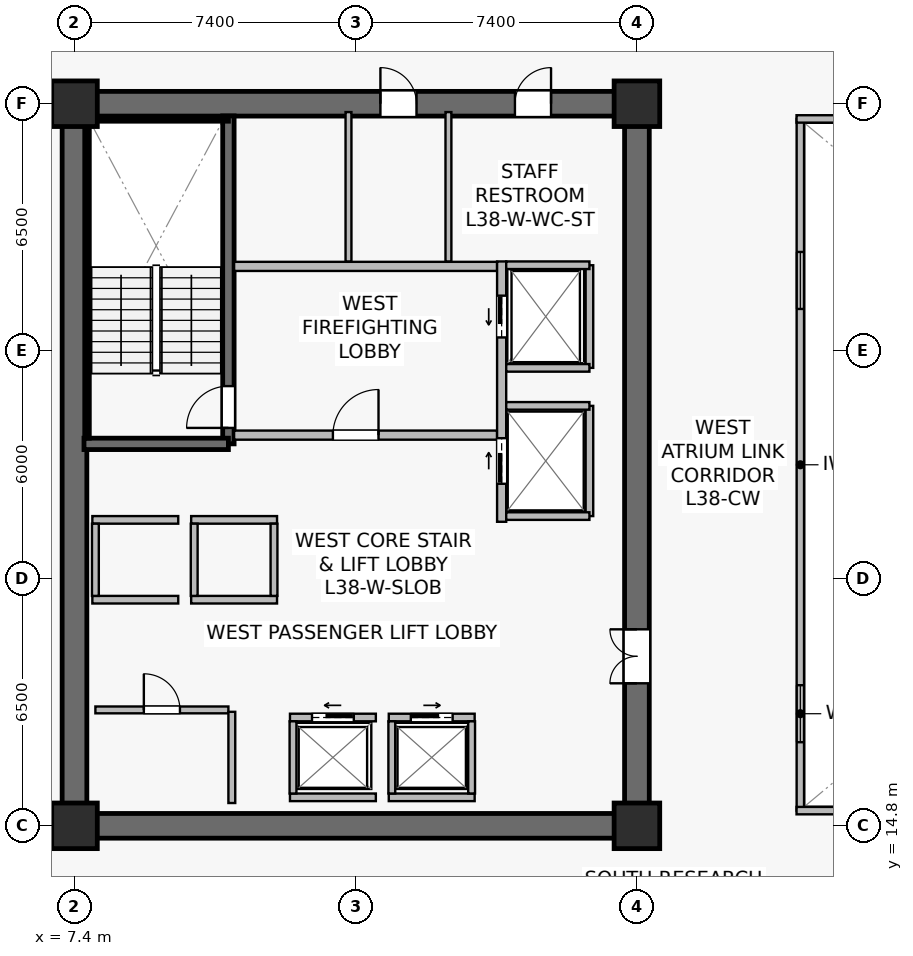
"""IFC4 building model, lengths in metres.
Left out: names, types, materials, properties, quantities, classifications, styles, units other than length and angle.
Written with IfcOpenShell. Run it as: python <this file> out.ifc"""

import sys

from ifc_helpers import new_model, si_unit, direction, frame, frame_2d, origin, origin_2d, place, context, subcontext, project, spatial, rectangle, extrude, source, transform, mapped, element, fill, save


model = new_model("IFC4")
c1 = context("Model", 3, precision=1e-05, world=origin(), true_north=direction((0.0, 1.0)))
c2 = subcontext(c1, "Body", "Model", "MODEL_VIEW")
j1 = project(units=[si_unit("LENGTHUNIT", "METRE"), si_unit("PLANEANGLEUNIT", "RADIAN")], contexts=[c1])
p1 = place(None, origin())
s1 = spatial("IfcSite", under=j1, at=p1, CompositionType="ELEMENT")
p2 = place(p1, origin())
s2 = spatial("IfcBuilding", under=s1, at=p2, CompositionType="ELEMENT")
p3 = place(p2, frame((0.0, 0.0, 158.4)))
s3 = spatial("IfcBuildingStorey", under=s2, at=p3, CompositionType="ELEMENT", Elevation=158.4)
p4 = place(p3, frame((7.075, 14.8, 0.0), z_axis=(0.0, 0.0, 1.0), x_axis=(1.0, 0.0, 0.0)))
e1 = element("IfcWall", 1, at=p4, inside=s3, PredefinedType="SHEAR", context=c2, shape_type="SweptSolid", body=[
    extrude(rectangle(XDim=15.45, YDim=0.65, at=frame_2d((7.725, 0.0))), origin(), (0.0, 0.0, 1.0), 3.79),
])
p5 = place(p3, frame((7.075, 33.8, 0.0), z_axis=(0.0, 0.0, 1.0), x_axis=(1.0, 0.0, 0.0)))
e2 = element("IfcWall", 2, at=p5, inside=s3, PredefinedType="SHEAR", context=c2, shape_type="SweptSolid", body=[
    extrude(rectangle(XDim=15.45, YDim=0.65, at=frame_2d((7.725, 0.0))), origin(), (0.0, 0.0, 1.0), 3.79),
])
p6 = place(p5, frame((8.375, 0.0, 0.0)))
e3 = element("IfcOpeningElement", 3, at=p6, cuts=e2, PredefinedType="OPENING", context=c2, shape_type="SweptSolid", body=[
    extrude(rectangle(XDim=0.95, YDim=2.15, at=frame_2d((0.475, 1.075))), frame((0.0, 0.335, 0.0), z_axis=(0.0, -1.0, 0.0), x_axis=(1.0, 0.0, 0.0)), (0.0, 0.0, 1.0), 0.67),
])
p7 = place(p5, frame((11.915, 0.0, 0.0)))
e4 = element("IfcOpeningElement", 4, at=p7, cuts=e2, PredefinedType="OPENING", context=c2, shape_type="SweptSolid", body=[
    extrude(rectangle(XDim=0.95, YDim=2.15, at=frame_2d((0.475, 1.075))), frame((0.0, 0.335, 0.0), z_axis=(0.0, -1.0, 0.0), x_axis=(1.0, 0.0, 0.0)), (0.0, 0.0, 1.0), 0.67),
])
p8 = place(p3, frame((7.4, 15.125, 0.0), z_axis=(0.0, 0.0, 1.0), x_axis=(0.0, 1.0, 0.0)))
e5 = element("IfcWall", 5, at=p8, inside=s3, PredefinedType="SHEAR", context=c2, shape_type="SweptSolid", body=[
    extrude(rectangle(XDim=18.35, YDim=0.65, at=frame_2d((9.175, 0.0))), origin(), (0.0, 0.0, 1.0), 3.79),
])
p9 = place(p3, frame((22.2, 15.125, 0.0), z_axis=(0.0, 0.0, 1.0), x_axis=(0.0, 1.0, 0.0)))
e6 = element("IfcWall", 6, at=p9, inside=s3, PredefinedType="SHEAR", context=c2, shape_type="SweptSolid", body=[
    extrude(rectangle(XDim=18.35, YDim=0.65, at=frame_2d((9.175, 0.0))), origin(), (0.0, 0.0, 1.0), 3.79),
])
p10 = place(p9, frame((3.425, 0.0, 0.0)))
e7 = element("IfcOpeningElement", 7, at=p10, cuts=e6, PredefinedType="OPENING", context=c2, shape_type="SweptSolid", body=[
    extrude(rectangle(XDim=1.42, YDim=2.2, at=frame_2d((0.71, 1.1))), frame((0.0, 0.335, 0.0), z_axis=(0.0, -1.0, 0.0), x_axis=(1.0, 0.0, 0.0)), (0.0, 0.0, 1.0), 0.67),
])
p11 = place(p3, frame((11.45, 24.85, 0.0), z_axis=(0.0, 0.0, 1.0), x_axis=(0.0, 1.0, 0.0)))
e8 = element("IfcWall", 8, at=p11, inside=s3, PredefinedType="SHEAR", context=c2, shape_type="SweptSolid", body=[
    extrude(rectangle(XDim=8.63, YDim=0.3, at=frame_2d((4.315, 0.0))), origin(), (0.0, 0.0, 1.0), 3.79),
])
p12 = place(p11, frame((0.42, 0.0, 0.0)))
e9 = element("IfcOpeningElement", 9, at=p12, cuts=e8, PredefinedType="OPENING", context=c2, shape_type="SweptSolid", body=[
    extrude(rectangle(XDim=1.1, YDim=2.15, at=frame_2d((0.55, 1.075))), frame((0.0, 0.16, 0.0), z_axis=(0.0, -1.0, 0.0), x_axis=(1.0, 0.0, 0.0)), (0.0, 0.0, 1.0), 0.32),
])
p13 = place(p3, frame((7.65, 24.85, 0.0), z_axis=(0.0, 0.0, 1.0), x_axis=(1.0, 0.0, 0.0)))
e10 = element("IfcWall", 10, at=p13, inside=s3, PredefinedType="SHEAR", context=c2, shape_type="SweptSolid", body=[
    extrude(rectangle(XDim=3.8, YDim=0.3, at=frame_2d((1.9, 0.0))), origin(), (0.0, 0.0, 1.0), 3.79),
])
p14 = place(p3, frame((7.73, 33.4, 0.0), z_axis=(0.0, 0.0, 1.0), x_axis=(1.0, 0.0, 0.0)))
e11 = element("IfcWall", 11, at=p14, inside=s3, PredefinedType="SOLIDWALL", context=c2, shape_type="SweptSolid", body=[
    extrude(rectangle(XDim=3.72, YDim=0.12, at=frame_2d((1.86, 0.0))), origin(), (0.0, 0.0, 1.0), 3.79),
])
p15 = place(p3, frame((7.73, 25.0, 0.0), z_axis=(0.0, 0.0, 1.0), x_axis=(0.0, 1.0, 0.0)))
e12 = element("IfcWall", 12, at=p15, inside=s3, PredefinedType="SOLIDWALL", context=c2, shape_type="SweptSolid", body=[
    extrude(rectangle(XDim=8.32, YDim=0.12, at=frame_2d((4.16, 0.0))), origin(), (0.0, 0.0, 1.0), 3.79),
])
m1 = source(origin(), c2, "Body", "SweptSolid", [
    extrude(rectangle(XDim=1.2, YDim=1.2, at=origin_2d()), origin(), (0.0, 0.0, 1.0), 4.1),
])
for number, where, z_axis, x_axis in (
    (13, (7.4, 14.8, 0.0), (0.0, 0.0, 1.0), (1.0, 0.0, 0.0)),
    (14, (22.2, 14.8, 0.0), (0.0, 0.0, 1.0), (1.0, 0.0, 0.0)),
    (15, (7.4, 33.8, 0.0), (0.0, 0.0, 1.0), (1.0, 0.0, 0.0)),
    (16, (22.2, 33.8, 0.0), (0.0, 0.0, 1.0), (1.0, 0.0, 0.0)),
):
    element("IfcColumn", number, at=place(p3, frame(where, z_axis=z_axis, x_axis=x_axis)), inside=s3, PredefinedType="COLUMN", context=c2, shape_type="MappedRepresentation", body=[
        mapped(m1, transform((0.0, 0.0, 0.0), scale=1.0)),
    ])
p16 = place(p3, frame((11.6, 25.08, 0.0), z_axis=(0.0, 0.0, 1.0), x_axis=(1.0, 0.0, 0.0)))
e17 = element("IfcWall", 17, at=p16, inside=s3, PredefinedType="SOLIDWALL", context=c2, shape_type="SweptSolid", body=[
    extrude(rectangle(XDim=6.92, YDim=0.24, at=frame_2d((3.46, 0.0))), origin(), (0.0, 0.0, 1.0), 3.187),
])
p17 = place(p16, frame((2.6, 0.0, 0.0)))
e18 = element("IfcOpeningElement", 18, at=p17, cuts=e17, PredefinedType="OPENING", context=c2, shape_type="SweptSolid", body=[
    extrude(rectangle(XDim=1.2, YDim=2.16, at=frame_2d((0.6, 1.08))), frame((0.0, 0.13, 0.0), z_axis=(0.0, -1.0, 0.0), x_axis=(1.0, 0.0, 0.0)), (0.0, 0.0, 1.0), 0.26),
])
p18 = place(p3, frame((11.6, 29.52, 0.0), z_axis=(0.0, 0.0, 1.0), x_axis=(1.0, 0.0, 0.0)))
e19 = element("IfcWall", 19, at=p18, inside=s3, PredefinedType="SOLIDWALL", context=c2, shape_type="SweptSolid", body=[
    extrude(rectangle(XDim=6.92, YDim=0.24, at=frame_2d((3.46, 0.0))), origin(), (0.0, 0.0, 1.0), 3.187),
])
p19 = place(p3, frame((18.64, 22.8, 0.0), z_axis=(0.0, 0.0, 1.0), x_axis=(0.0, 1.0, 0.0)))
e20 = element("IfcWall", 20, at=p19, inside=s3, PredefinedType="SOLIDWALL", context=c2, shape_type="SweptSolid", body=[
    extrude(rectangle(XDim=6.85, YDim=0.24, at=frame_2d((3.425, 0.0))), origin(), (0.0, 0.0, 1.0), 2.875),
])
p20 = place(p19, frame((4.85, 0.0, 0.0)))
e21 = element("IfcOpeningElement", 21, at=p20, cuts=e20, PredefinedType="OPENING", context=c2, shape_type="SweptSolid", body=[
    extrude(rectangle(XDim=1.1, YDim=2.22, at=frame_2d((0.55, 1.11))), frame((0.0, 0.13, 0.0), z_axis=(0.0, -1.0, 0.0), x_axis=(1.0, 0.0, 0.0)), (0.0, 0.0, 1.0), 0.26),
])
p21 = place(p19, frame((1.0, 0.0, 0.0)))
e22 = element("IfcOpeningElement", 22, at=p21, cuts=e20, PredefinedType="OPENING", context=c2, shape_type="SweptSolid", body=[
    extrude(rectangle(XDim=1.2, YDim=2.22, at=frame_2d((0.6, 1.11))), frame((0.0, 0.13, 0.0), z_axis=(0.0, -1.0, 0.0), x_axis=(1.0, 0.0, 0.0)), (0.0, 0.0, 1.0), 0.26),
])
p22 = place(p3, frame((13.07, 17.65, 0.0), z_axis=(0.0, 0.0, 1.0), x_axis=(1.0, 0.0, 0.0)))
e23 = element("IfcWall", 23, at=p22, inside=s3, PredefinedType="SOLIDWALL", context=c2, shape_type="SweptSolid", body=[
    extrude(rectangle(XDim=2.26, YDim=0.2, at=frame_2d((1.13, 0.0))), origin(), (0.0, 0.0, 1.0), 3.187),
])
p23 = place(p22, frame((0.58, 0.0, 0.0)))
e24 = element("IfcOpeningElement", 24, at=p23, cuts=e23, PredefinedType="OPENING", context=c2, shape_type="SweptSolid", body=[
    extrude(rectangle(XDim=1.1, YDim=2.22, at=frame_2d((0.55, 1.11))), frame((0.0, 0.11, 0.0), z_axis=(0.0, -1.0, 0.0), x_axis=(1.0, 0.0, 0.0)), (0.0, 0.0, 1.0), 0.22),
])
p24 = place(p3, frame((13.07, 15.55, 0.0), z_axis=(0.0, 0.0, 1.0), x_axis=(1.0, 0.0, 0.0)))
e25 = element("IfcWall", 25, at=p24, inside=s3, PredefinedType="SOLIDWALL", context=c2, shape_type="SweptSolid", body=[
    extrude(rectangle(XDim=2.26, YDim=0.2, at=frame_2d((1.13, 0.0))), origin(), (0.0, 0.0, 1.0), 3.187),
])
p25 = place(p3, frame((13.15, 15.65, 0.0), z_axis=(0.0, 0.0, 1.0), x_axis=(0.0, 1.0, 0.0)))
e26 = element("IfcWall", 26, at=p25, inside=s3, PredefinedType="SOLIDWALL", context=c2, shape_type="SweptSolid", body=[
    extrude(rectangle(XDim=1.9, YDim=0.18, at=frame_2d((0.95, 0.0))), origin(), (0.0, 0.0, 1.0), 3.79),
])
p26 = place(p3, frame((15.67, 17.65, 0.0), z_axis=(0.0, 0.0, 1.0), x_axis=(1.0, 0.0, 0.0)))
e27 = element("IfcWall", 27, at=p26, inside=s3, PredefinedType="SOLIDWALL", context=c2, shape_type="SweptSolid", body=[
    extrude(rectangle(XDim=2.26, YDim=0.2, at=frame_2d((1.13, 0.0))), origin(), (0.0, 0.0, 1.0), 3.79),
])
p27 = place(p26, frame((0.58, 0.0, 0.0)))
e28 = element("IfcOpeningElement", 28, at=p27, cuts=e27, PredefinedType="OPENING", context=c2, shape_type="SweptSolid", body=[
    extrude(rectangle(XDim=1.1, YDim=2.22, at=frame_2d((0.55, 1.11))), frame((0.0, 0.11, 0.0), z_axis=(0.0, -1.0, 0.0), x_axis=(1.0, 0.0, 0.0)), (0.0, 0.0, 1.0), 0.22),
])
p28 = place(p3, frame((15.67, 15.55, 0.0), z_axis=(0.0, 0.0, 1.0), x_axis=(1.0, 0.0, 0.0)))
e29 = element("IfcWall", 29, at=p28, inside=s3, PredefinedType="SOLIDWALL", context=c2, shape_type="SweptSolid", body=[
    extrude(rectangle(XDim=2.26, YDim=0.2, at=frame_2d((1.13, 0.0))), origin(), (0.0, 0.0, 1.0), 3.79),
])
for number, where, z_axis, x_axis in (
    (30, (15.75, 15.65, 0.0), (0.0, 0.0, 1.0), (0.0, 1.0, 0.0)),
    (31, (17.85, 15.65, 0.0), (0.0, 0.0, 1.0), (0.0, 1.0, 0.0)),
):
    element("IfcWall", number, at=place(p3, frame(where, z_axis=z_axis, x_axis=x_axis)), inside=s3, PredefinedType="SOLIDWALL", context=c2, shape_type="SweptSolid", body=[
        extrude(rectangle(XDim=1.9, YDim=0.18, at=frame_2d((0.95, 0.0))), origin(), (0.0, 0.0, 1.0), 3.79),
    ])
for number, where, z_axis, x_axis in (
    (32, (7.87, 20.75, 0.0), (0.0, 0.0, 1.0), (1.0, 0.0, 0.0)),
    (33, (7.87, 22.85, 0.0), (0.0, 0.0, 1.0), (1.0, 0.0, 0.0)),
):
    element("IfcWall", number, at=place(p3, frame(where, z_axis=z_axis, x_axis=x_axis)), inside=s3, PredefinedType="SOLIDWALL", context=c2, shape_type="SweptSolid", body=[
        extrude(rectangle(XDim=2.26, YDim=0.2, at=frame_2d((1.13, 0.0))), origin(), (0.0, 0.0, 1.0), 3.79),
    ])
p29 = place(p3, frame((7.95, 20.85, 0.0), z_axis=(0.0, 0.0, 1.0), x_axis=(0.0, 1.0, 0.0)))
e34 = element("IfcWall", 34, at=p29, inside=s3, PredefinedType="SOLIDWALL", context=c2, shape_type="SweptSolid", body=[
    extrude(rectangle(XDim=1.9, YDim=0.18, at=frame_2d((0.95, 0.0))), origin(), (0.0, 0.0, 1.0), 3.79),
])
for number, where, z_axis, x_axis in (
    (35, (10.47, 20.75, 0.0), (0.0, 0.0, 1.0), (1.0, 0.0, 0.0)),
    (36, (10.47, 22.85, 0.0), (0.0, 0.0, 1.0), (1.0, 0.0, 0.0)),
):
    element("IfcWall", number, at=place(p3, frame(where, z_axis=z_axis, x_axis=x_axis)), inside=s3, PredefinedType="SOLIDWALL", context=c2, shape_type="SweptSolid", body=[
        extrude(rectangle(XDim=2.26, YDim=0.2, at=frame_2d((1.13, 0.0))), origin(), (0.0, 0.0, 1.0), 3.79),
    ])
for number, where, z_axis, x_axis in (
    (37, (10.55, 20.85, 0.0), (0.0, 0.0, 1.0), (0.0, 1.0, 0.0)),
    (38, (12.65, 20.85, 0.0), (0.0, 0.0, 1.0), (0.0, 1.0, 0.0)),
):
    element("IfcWall", number, at=place(p3, frame(where, z_axis=z_axis, x_axis=x_axis)), inside=s3, PredefinedType="SOLIDWALL", context=c2, shape_type="SweptSolid", body=[
        extrude(rectangle(XDim=1.9, YDim=0.18, at=frame_2d((0.95, 0.0))), origin(), (0.0, 0.0, 1.0), 3.79),
    ])
p30 = place(p3, frame((20.95, 26.85, 0.0), z_axis=(0.0, 0.0, 1.0), x_axis=(0.0, 1.0, 0.0)))
e39 = element("IfcWall", 39, at=p30, inside=s3, PredefinedType="SOLIDWALL", context=c2, shape_type="SweptSolid", body=[
    extrude(rectangle(XDim=2.7, YDim=0.2, at=frame_2d((1.35, 0.0))), origin(), (0.0, 0.0, 1.0), 3.79),
])
p31 = place(p3, frame((18.76, 29.55, 0.0), z_axis=(0.0, 0.0, 1.0), x_axis=(1.0, 0.0, 0.0)))
e40 = element("IfcWall", 40, at=p31, inside=s3, PredefinedType="SOLIDWALL", context=c2, shape_type="SweptSolid", body=[
    extrude(rectangle(XDim=2.19, YDim=0.2, at=frame_2d((1.095, 0.0))), origin(), (0.0, 0.0, 1.0), 3.79),
])
p32 = place(p3, frame((18.76, 26.85, 0.0), z_axis=(0.0, 0.0, 1.0), x_axis=(1.0, 0.0, 0.0)))
e41 = element("IfcWall", 41, at=p32, inside=s3, PredefinedType="SOLIDWALL", context=c2, shape_type="SweptSolid", body=[
    extrude(rectangle(XDim=2.19, YDim=0.2, at=frame_2d((1.095, 0.0))), origin(), (0.0, 0.0, 1.0), 3.187),
])
p33 = place(p3, frame((20.95, 22.95, 0.0), z_axis=(0.0, 0.0, 1.0), x_axis=(0.0, 1.0, 0.0)))
e42 = element("IfcWall", 42, at=p33, inside=s3, PredefinedType="SOLIDWALL", context=c2, shape_type="SweptSolid", body=[
    extrude(rectangle(XDim=2.9, YDim=0.2, at=frame_2d((1.45, 0.0))), origin(), (0.0, 0.0, 1.0), 2.875),
])
for number, where, z_axis, x_axis in (
    (43, (18.76, 25.85, 0.0), (0.0, 0.0, 1.0), (1.0, 0.0, 0.0)),
    (44, (18.76, 22.95, 0.0), (0.0, 0.0, 1.0), (1.0, 0.0, 0.0)),
):
    element("IfcWall", number, at=place(p3, frame(where, z_axis=z_axis, x_axis=x_axis)), inside=s3, PredefinedType="SOLIDWALL", context=c2, shape_type="SweptSolid", body=[
        extrude(rectangle(XDim=2.19, YDim=0.2, at=frame_2d((1.095, 0.0))), origin(), (0.0, 0.0, 1.0), 3.79),
    ])
p34 = place(p3, frame((7.95, 17.85, 0.0), z_axis=(0.0, 0.0, 1.0), x_axis=(1.0, 0.0, 0.0)))
e45 = element("IfcWall", 45, at=p34, inside=s3, PredefinedType="SOLIDWALL", context=c2, shape_type="SweptSolid", body=[
    extrude(rectangle(XDim=3.5, YDim=0.18, at=frame_2d((1.75, 0.0))), origin(), (0.0, 0.0, 1.0), 3.79),
])
p35 = place(p34, frame((1.275, 0.0, 0.0)))
e46 = element("IfcOpeningElement", 46, at=p35, cuts=e45, PredefinedType="OPENING", context=c2, shape_type="SweptSolid", body=[
    extrude(rectangle(XDim=0.95, YDim=2.15, at=frame_2d((0.475, 1.075))), frame((0.0, 0.1, 0.0), z_axis=(0.0, -1.0, 0.0), x_axis=(1.0, 0.0, 0.0)), (0.0, 0.0, 1.0), 0.2),
])
p36 = place(p3, frame((11.54, 15.4, 0.0), z_axis=(0.0, 0.0, 1.0), x_axis=(0.0, 1.0, 0.0)))
e47 = element("IfcWall", 47, at=p36, inside=s3, PredefinedType="SOLIDWALL", context=c2, shape_type="SweptSolid", body=[
    extrude(rectangle(XDim=2.4, YDim=0.18, at=frame_2d((1.2, 0.0))), origin(), (0.0, 0.0, 1.0), 3.79),
])
p37 = place(p3, frame((14.61, 29.65, 0.0), z_axis=(0.0, 0.0, 1.0), x_axis=(0.0, 1.0, 0.0)))
e48 = element("IfcWall", 48, at=p37, inside=s3, PredefinedType="PLUMBINGWALL", context=c2, shape_type="SweptSolid", body=[
    extrude(rectangle(XDim=3.93, YDim=0.155, at=frame_2d((1.965, 0.0))), origin(), (0.0, 0.0, 1.0), 3.187),
])
p38 = place(p3, frame((17.24, 29.65, 0.0), z_axis=(0.0, 0.0, 1.0), x_axis=(0.0, 1.0, 0.0)))
e49 = element("IfcWall", 49, at=p38, inside=s3, PredefinedType="PLUMBINGWALL", context=c2, shape_type="SweptSolid", body=[
    extrude(rectangle(XDim=3.93, YDim=0.155, at=frame_2d((1.965, 0.0))), origin(), (0.0, 0.0, 1.0), 3.79),
])
p39 = place(p3, frame((26.5, 15.2, 0.0), z_axis=(0.0, 0.0, 1.0), x_axis=(0.0, 1.0, 0.0)))
e50 = element("IfcWall", 50, at=p39, inside=s3, PredefinedType="SOLIDWALL", context=c2, shape_type="SweptSolid", body=[
    extrude(rectangle(XDim=18.2, YDim=0.195, at=frame_2d((9.1, 0.0))), origin(), (0.0, 0.0, 1.0), 3.79),
])
p40 = place(p39, frame((1.8, 0.0, 0.9)))
e51 = element("IfcOpeningElement", 51, at=p40, cuts=e50, PredefinedType="OPENING", context=c2, shape_type="SweptSolid", body=[
    extrude(rectangle(XDim=1.5, YDim=1.4, at=frame_2d((0.75, 0.7))), frame((0.0, 0.107, 0.0), z_axis=(0.0, -1.0, 0.0), x_axis=(1.0, 0.0, 0.0)), (0.0, 0.0, 1.0), 0.215),
])
p41 = place(p39, frame((13.2, 0.0, 0.9)))
e52 = element("IfcOpeningElement", 52, at=p41, cuts=e50, PredefinedType="OPENING", context=c2, shape_type="SweptSolid", body=[
    extrude(rectangle(XDim=1.5, YDim=1.4, at=frame_2d((0.75, 0.7))), frame((0.0, 0.107, 0.0), z_axis=(0.0, -1.0, 0.0), x_axis=(1.0, 0.0, 0.0)), (0.0, 0.0, 1.0), 0.215),
])
for number, where, z_axis, x_axis in (
    (53, (26.4, 15.2, 0.0), (0.0, 0.0, 1.0), (1.0, 0.0, 0.0)),
    (54, (26.4, 33.4, 0.0), (0.0, 0.0, 1.0), (1.0, 0.0, 0.0)),
):
    element("IfcWall", number, at=place(p3, frame(where, z_axis=z_axis, x_axis=x_axis)), inside=s3, PredefinedType="SOLIDWALL", context=c2, shape_type="SweptSolid", body=[
        extrude(rectangle(XDim=22.0, YDim=0.195, at=frame_2d((11.0, 0.0))), origin(), (0.0, 0.0, 1.0), 3.79),
    ])
m2 = source(origin(), c2, "Body", "SweptSolid", [
    extrude(rectangle(XDim=1.5, YDim=1.4, at=frame_2d((0.75, 0.7))), frame((0.0, 0.03, 0.0), z_axis=(0.0, -1.0, 0.0), x_axis=(1.0, 0.0, 0.0)), (0.0, 0.0, 1.0), 0.06),
])
p42 = place(p40, origin())
e55 = element("IfcWindow", 55, at=p42, inside=s3, PartitioningType="SINGLE_PANEL", PredefinedType="WINDOW", context=c2, shape_type="MappedRepresentation", body=[
    mapped(m2, transform((0.0, 0.0, 0.0), scale=1.0)),
])
fill(e51, e55)
p43 = place(p41, origin())
e56 = element("IfcWindow", 56, at=p43, inside=s3, PartitioningType="SINGLE_PANEL", PredefinedType="WINDOW", context=c2, shape_type="MappedRepresentation", body=[
    mapped(m2, transform((0.0, 0.0, 0.0), scale=1.0)),
])
fill(e52, e56)
m3 = source(origin(), c2, "Body", "SweptSolid", [
    extrude(rectangle(XDim=1.1, YDim=2.15, at=frame_2d((0.55, 1.075))), frame((0.0, 0.025, 0.0), z_axis=(0.0, -1.0, 0.0), x_axis=(1.0, 0.0, 0.0)), (0.0, 0.0, 1.0), 0.05),
])
p44 = place(p12, origin())
e57 = element("IfcDoor", 57, at=p44, inside=s3, OperationType="SINGLE_SWING_LEFT", PredefinedType="DOOR", context=c2, shape_type="MappedRepresentation", body=[
    mapped(m3, transform((0.0, 0.0, 0.0), scale=1.0)),
])
fill(e9, e57)
m4 = source(origin(), c2, "Body", "SweptSolid", [
    extrude(rectangle(XDim=1.2, YDim=2.16, at=frame_2d((0.6, 1.08))), frame((0.0, 0.025, 0.0), z_axis=(0.0, -1.0, 0.0), x_axis=(1.0, 0.0, 0.0)), (0.0, 0.0, 1.0), 0.05),
])
p45 = place(p17, origin())
e58 = element("IfcDoor", 58, at=p45, inside=s3, OperationType="SINGLE_SWING_RIGHT", PredefinedType="DOOR", context=c2, shape_type="MappedRepresentation", body=[
    mapped(m4, transform((0.0, 0.0, 0.0), scale=1.0)),
])
fill(e18, e58)
m5 = source(origin(), c2, "Body", "SweptSolid", [
    extrude(rectangle(XDim=1.1, YDim=2.22, at=frame_2d((0.55, 1.11))), frame((0.0, 0.025, 0.0), z_axis=(0.0, -1.0, 0.0), x_axis=(1.0, 0.0, 0.0)), (0.0, 0.0, 1.0), 0.05),
])
p46 = place(p23, origin())
e59 = element("IfcDoor", 59, at=p46, inside=s3, OperationType="SLIDING_TO_LEFT", PredefinedType="USERDEFINED", context=c2, shape_type="MappedRepresentation", body=[
    mapped(m5, transform((0.0, 0.0, 0.0), scale=1.0)),
])
fill(e24, e59)
p47 = place(p27, origin())
e60 = element("IfcDoor", 60, at=p47, inside=s3, OperationType="SLIDING_TO_RIGHT", PredefinedType="USERDEFINED", context=c2, shape_type="MappedRepresentation", body=[
    mapped(m5, transform((0.0, 0.0, 0.0), scale=1.0)),
])
fill(e28, e60)
p48 = place(p20, origin())
e61 = element("IfcDoor", 61, at=p48, inside=s3, OperationType="SLIDING_TO_LEFT", PredefinedType="USERDEFINED", context=c2, shape_type="MappedRepresentation", body=[
    mapped(m5, transform((0.0, 0.0, 0.0), scale=1.0)),
])
fill(e21, e61)
m6 = source(origin(), c2, "Body", "SweptSolid", [
    extrude(rectangle(XDim=1.2, YDim=2.22, at=frame_2d((0.6, 1.11))), frame((0.0, 0.025, 0.0), z_axis=(0.0, -1.0, 0.0), x_axis=(1.0, 0.0, 0.0)), (0.0, 0.0, 1.0), 0.05),
])
p49 = place(p21, origin())
e62 = element("IfcDoor", 62, at=p49, inside=s3, OperationType="SLIDING_TO_RIGHT", PredefinedType="USERDEFINED", context=c2, shape_type="MappedRepresentation", body=[
    mapped(m6, transform((0.0, 0.0, 0.0), scale=1.0)),
])
fill(e22, e62)
m7 = source(origin(), c2, "Body", "SweptSolid", [
    extrude(rectangle(XDim=0.95, YDim=2.15, at=frame_2d((0.475, 1.075))), frame((0.0, 0.025, 0.0), z_axis=(0.0, -1.0, 0.0), x_axis=(1.0, 0.0, 0.0)), (0.0, 0.0, 1.0), 0.05),
])
p50 = place(p35, origin())
e63 = element("IfcDoor", 63, at=p50, inside=s3, OperationType="SINGLE_SWING_LEFT", PredefinedType="DOOR", context=c2, shape_type="MappedRepresentation", body=[
    mapped(m7, transform((0.0, 0.0, 0.0), scale=1.0)),
])
fill(e46, e63)
m8 = source(origin(), c2, "Body", "SweptSolid", [
    extrude(rectangle(XDim=1.42, YDim=2.2, at=frame_2d((0.71, 1.1))), frame((0.0, 0.025, 0.0), z_axis=(0.0, -1.0, 0.0), x_axis=(1.0, 0.0, 0.0)), (0.0, 0.0, 1.0), 0.05),
])
p51 = place(p10, origin())
e64 = element("IfcDoor", 64, at=p51, inside=s3, OperationType="DOUBLE_DOOR_SINGLE_SWING", PredefinedType="DOOR", context=c2, shape_type="MappedRepresentation", body=[
    mapped(m8, transform((0.0, 0.0, 0.0), scale=1.0)),
])
fill(e7, e64)
p52 = place(p6, origin())
e65 = element("IfcDoor", 65, at=p52, inside=s3, OperationType="SINGLE_SWING_LEFT", PredefinedType="DOOR", context=c2, shape_type="MappedRepresentation", body=[
    mapped(m7, transform((0.0, 0.0, 0.0), scale=1.0)),
])
fill(e3, e65)
p53 = place(p7, origin())
e66 = element("IfcDoor", 66, at=p53, inside=s3, OperationType="SINGLE_SWING_RIGHT", PredefinedType="DOOR", context=c2, shape_type="MappedRepresentation", body=[
    mapped(m7, transform((0.0, 0.0, 0.0), scale=1.0)),
])
fill(e4, e66)
save(model, sys.argv[1])
